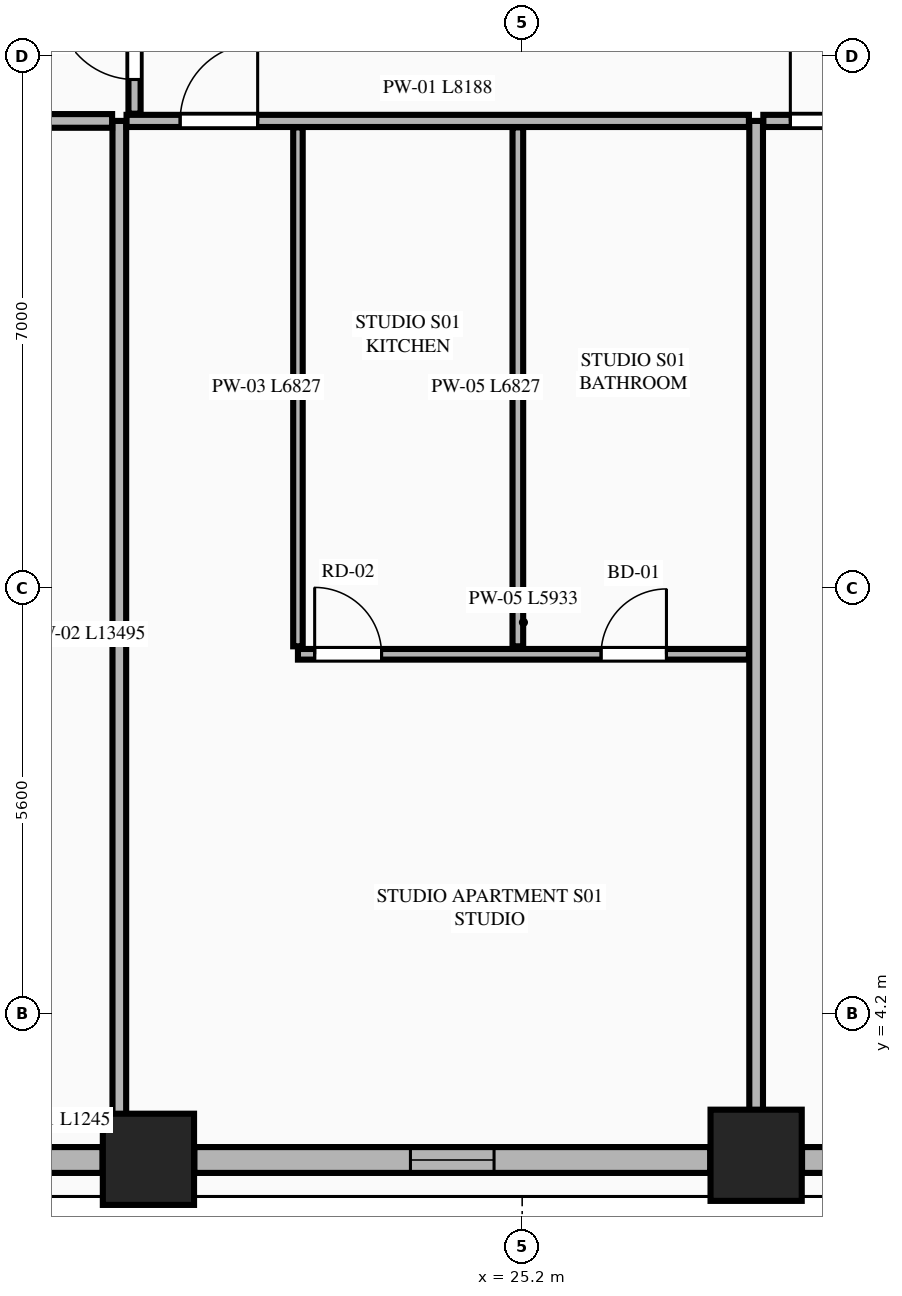
"""IFC4 building model, lengths in metres.
Left out: names, types, materials, properties, quantities, classifications, styles, units other than length and angle.
Written with IfcOpenShell. Run it as: python <this file> out.ifc"""

import sys

from ifc_helpers import new_model, si_unit, direction, frame, frame_2d, origin, origin_2d, place, context, subcontext, project, spatial, rectangle, extrude, element, fill, save


model = new_model("IFC4")
c1 = context("Model", 3, precision=1e-05, world=origin(), true_north=direction((0.0, 1.0)))
c2 = subcontext(c1, "Body", "Model", "MODEL_VIEW")
j1 = project(units=[si_unit("LENGTHUNIT", "METRE"), si_unit("PLANEANGLEUNIT", "RADIAN")], contexts=[c1])
p1 = place(None, origin())
s1 = spatial("IfcSite", under=j1, at=p1, CompositionType="ELEMENT")
p2 = place(p1, origin())
s2 = spatial("IfcBuilding", under=s1, at=p2, CompositionType="ELEMENT")
p3 = place(p2, frame((0.0, 0.0, 35.55)))
s3 = spatial("IfcBuildingStorey", under=s2, at=p3, CompositionType="ELEMENT", Elevation=35.55)
for number, where, z_axis, x_axis in (
    (1, (20.283, 2.289, 0.0), (0.0, 0.0, 1.0), (1.0, 0.0, 0.0)),
    (2, (28.278, 2.342, 0.0), (0.0, 0.0, 1.0), (1.0, 0.0, 0.0)),
):
    element("IfcColumn", number, at=place(p3, frame(where, z_axis=z_axis, x_axis=x_axis)), inside=s3, PredefinedType="COLUMN", context=c2, shape_type="SweptSolid", body=[
        extrude(rectangle(XDim=1.2, YDim=1.2, at=origin_2d()), origin(), (0.0, 0.0, 1.0), 3.55),
    ])
p4 = place(p3, frame((18.434, 2.28, 0.0), z_axis=(0.0, 0.0, 1.0), x_axis=(1.0, 0.0, 0.0)))
e3 = element("IfcWall", 3, at=p4, inside=s3, PredefinedType="STANDARD", context=c2, shape_type="SweptSolid", body=[
    extrude(rectangle(XDim=1.245, YDim=0.34, at=frame_2d((0.623, 0.0))), origin(), (0.0, 0.0, 1.0), 3.33),
])
p5 = place(p3, frame((20.887, 2.28, 0.0), z_axis=(0.0, 0.0, 1.0), x_axis=(1.0, 0.0, 0.0)))
e4 = element("IfcWall", 4, at=p5, inside=s3, PredefinedType="STANDARD", context=c2, shape_type="SweptSolid", body=[
    extrude(rectangle(XDim=6.787, YDim=0.34, at=frame_2d((3.394, 0.0))), origin(), (0.0, 0.0, 1.0), 2.787),
])
p6 = place(p5, frame((2.843, 0.0, 0.75)))
e5 = element("IfcOpeningElement", 5, at=p6, cuts=e4, PredefinedType="OPENING", context=c2, shape_type="SweptSolid", body=[
    extrude(rectangle(XDim=1.1, YDim=1.887, at=frame_2d((0.55, 0.943))), frame((0.0, 0.18, 0.0), z_axis=(0.0, -1.0, 0.0), x_axis=(1.0, 0.0, 0.0)), (0.0, 0.0, 1.0), 0.36),
])
p7 = place(p3, frame((28.882, 2.28, 0.0), z_axis=(0.0, 0.0, 1.0), x_axis=(1.0, 0.0, 0.0)))
e6 = element("IfcWall", 6, at=p7, inside=s3, PredefinedType="STANDARD", context=c2, shape_type="SweptSolid", body=[
    extrude(rectangle(XDim=7.036, YDim=0.34, at=frame_2d((3.518, 0.0))), origin(), (0.0, 0.0, 1.0), 2.787),
])
p8 = place(p7, frame((2.968, 0.0, 0.75)))
e7 = element("IfcOpeningElement", 7, at=p8, cuts=e6, PredefinedType="OPENING", context=c2, shape_type="SweptSolid", body=[
    extrude(rectangle(XDim=1.1, YDim=1.887, at=frame_2d((0.55, 0.943))), frame((0.0, 0.18, 0.0), z_axis=(0.0, -1.0, 0.0), x_axis=(1.0, 0.0, 0.0)), (0.0, 0.0, 1.0), 0.36),
])
p9 = place(p3, frame((19.9, 2.455, 0.0), z_axis=(0.0, 0.0, 1.0), x_axis=(0.0, 1.0, 0.0)))
e8 = element("IfcWall", 8, at=p9, inside=s3, PredefinedType="PARTITIONING", context=c2, shape_type="SweptSolid", body=[
    extrude(rectangle(XDim=13.495, YDim=0.18, at=frame_2d((6.748, 0.0))), origin(), (0.0, 0.0, 1.0), 3.33),
])
p10 = place(p3, frame((28.278, 2.455, 0.0), z_axis=(0.0, 0.0, 1.0), x_axis=(0.0, 1.0, 0.0)))
e9 = element("IfcWall", 9, at=p10, inside=s3, PredefinedType="PARTITIONING", context=c2, shape_type="SweptSolid", body=[
    extrude(rectangle(XDim=13.495, YDim=0.18, at=frame_2d((6.748, 0.0))), origin(), (0.0, 0.0, 1.0), 2.7),
])
p11 = place(p3, frame((19.995, 15.95, 0.0), z_axis=(0.0, 0.0, 1.0), x_axis=(1.0, 0.0, 0.0)))
e10 = element("IfcWall", 10, at=p11, inside=s3, PredefinedType="PARTITIONING", context=c2, shape_type="SweptSolid", body=[
    extrude(rectangle(XDim=8.188, YDim=0.16, at=frame_2d((4.094, 0.0))), origin(), (0.0, 0.0, 1.0), 3.33),
])
p12 = place(p11, frame((0.705, 0.0, 0.0)))
e11 = element("IfcOpeningElement", 11, at=p12, cuts=e10, PredefinedType="OPENING", context=c2, shape_type="SweptSolid", body=[
    extrude(rectangle(XDim=1.02, YDim=2.25, at=frame_2d((0.51, 1.125))), frame((0.0, 0.09, 0.0), z_axis=(0.0, -1.0, 0.0), x_axis=(1.0, 0.0, 0.0)), (0.0, 0.0, 1.0), 0.18),
])
p13 = place(p3, frame((22.25, 9.038, 0.0), z_axis=(0.0, 0.0, 1.0), x_axis=(0.0, 1.0, 0.0)))
e12 = element("IfcWall", 12, at=p13, inside=s3, PredefinedType="PARTITIONING", context=c2, shape_type="SweptSolid", body=[
    extrude(rectangle(XDim=6.827, YDim=0.125, at=frame_2d((3.414, 0.0))), origin(), (0.0, 0.0, 1.0), 2.7),
])
p14 = place(p3, frame((22.25, 8.933, 0.0), z_axis=(0.0, 0.0, 1.0), x_axis=(1.0, 0.0, 0.0)))
e13 = element("IfcWall", 13, at=p14, inside=s3, PredefinedType="PLUMBINGWALL", context=c2, shape_type="SweptSolid", body=[
    extrude(rectangle(XDim=5.933, YDim=0.14, at=frame_2d((2.967, 0.0))), origin(), (0.0, 0.0, 1.0), 3.33),
])
p15 = place(p14, frame((3.988, 0.0, 0.0)))
e14 = element("IfcOpeningElement", 14, at=p15, cuts=e13, PredefinedType="OPENING", context=c2, shape_type="SweptSolid", body=[
    extrude(rectangle(XDim=0.86, YDim=2.1, at=frame_2d((0.43, 1.05))), frame((0.0, 0.08, 0.0), z_axis=(0.0, -1.0, 0.0), x_axis=(1.0, 0.0, 0.0)), (0.0, 0.0, 1.0), 0.16),
])
p16 = place(p14, frame((0.22, 0.0, 0.0)))
e15 = element("IfcOpeningElement", 15, at=p16, cuts=e13, PredefinedType="OPENING", context=c2, shape_type="SweptSolid", body=[
    extrude(rectangle(XDim=0.88, YDim=2.15, at=frame_2d((0.44, 1.075))), frame((0.0, 0.08, 0.0), z_axis=(0.0, -1.0, 0.0), x_axis=(1.0, 0.0, 0.0)), (0.0, 0.0, 1.0), 0.16),
])
p17 = place(p3, frame((25.143, 9.038, 0.0), z_axis=(0.0, 0.0, 1.0), x_axis=(0.0, 1.0, 0.0)))
e16 = element("IfcWall", 16, at=p17, inside=s3, PredefinedType="PLUMBINGWALL", context=c2, shape_type="SweptSolid", body=[
    extrude(rectangle(XDim=6.827, YDim=0.14, at=frame_2d((3.414, 0.0))), origin(), (0.0, 0.0, 1.0), 3.33),
])
p18 = place(p3, frame((28.373, 15.95, 0.0), z_axis=(0.0, 0.0, 1.0), x_axis=(1.0, 0.0, 0.0)))
e17 = element("IfcWall", 17, at=p18, inside=s3, PredefinedType="PARTITIONING", context=c2, shape_type="SweptSolid", body=[
    extrude(rectangle(XDim=16.432, YDim=0.16, at=frame_2d((8.216, 0.0))), origin(), (0.0, 0.0, 1.0), 3.33),
])
p19 = place(p18, frame((0.355, 0.0, 0.0)))
e18 = element("IfcOpeningElement", 18, at=p19, cuts=e17, PredefinedType="OPENING", context=c2, shape_type="SweptSolid", body=[
    extrude(rectangle(XDim=1.35, YDim=2.35, at=frame_2d((0.675, 1.175))), frame((0.0, 0.09, 0.0), z_axis=(0.0, -1.0, 0.0), x_axis=(1.0, 0.0, 0.0)), (0.0, 0.0, 1.0), 0.18),
])
p20 = place(p3, frame((10.564, 15.95, 0.0), z_axis=(0.0, 0.0, 1.0), x_axis=(1.0, 0.0, 0.0)))
e19 = element("IfcWall", 19, at=p20, inside=s3, PredefinedType="PARTITIONING", context=c2, shape_type="SweptSolid", body=[
    extrude(rectangle(XDim=9.241, YDim=0.18, at=frame_2d((4.621, 0.0))), origin(), (0.0, 0.0, 1.0), 3.33),
])
p21 = place(p3, frame((20.1, 16.045, 0.0), z_axis=(0.0, 0.0, 1.0), x_axis=(0.0, 1.0, 0.0)))
e20 = element("IfcWall", 20, at=p21, inside=s3, PredefinedType="PARTITIONING", context=c2, shape_type="SweptSolid", body=[
    extrude(rectangle(XDim=9.76, YDim=0.16, at=frame_2d((4.88, 0.0))), origin(), (0.0, 0.0, 1.0), 2.7),
])
p22 = place(p21, frame((0.45, 0.0, 0.0)))
e21 = element("IfcOpeningElement", 21, at=p22, cuts=e20, PredefinedType="OPENING", context=c2, shape_type="SweptSolid", body=[
    extrude(rectangle(XDim=1.02, YDim=2.25, at=frame_2d((0.51, 1.125))), frame((0.0, 0.09, 0.0), z_axis=(0.0, -1.0, 0.0), x_axis=(1.0, 0.0, 0.0)), (0.0, 0.0, 1.0), 0.18),
])
p23 = place(p6, origin())
e22 = element("IfcWindow", 22, at=p23, inside=s3, PartitioningType="SINGLE_PANEL", PredefinedType="WINDOW", context=c2, shape_type="SweptSolid", body=[
    extrude(rectangle(XDim=1.1, YDim=1.887, at=frame_2d((0.55, 0.943))), frame((0.0, 0.03, 0.0), z_axis=(0.0, -1.0, 0.0), x_axis=(1.0, 0.0, 0.0)), (0.0, 0.0, 1.0), 0.06),
])
fill(e5, e22)
p24 = place(p15, origin())
e23 = element("IfcDoor", 23, at=p24, inside=s3, OperationType="SINGLE_SWING_RIGHT", PredefinedType="DOOR", context=c2, shape_type="SweptSolid", body=[
    extrude(rectangle(XDim=0.86, YDim=2.1, at=frame_2d((0.43, 1.05))), frame((0.0, 0.025, 0.0), z_axis=(0.0, -1.0, 0.0), x_axis=(1.0, 0.0, 0.0)), (0.0, 0.0, 1.0), 0.05),
])
fill(e14, e23)
p25 = place(p12, origin())
e24 = element("IfcDoor", 24, at=p25, inside=s3, OperationType="SINGLE_SWING_RIGHT", PredefinedType="DOOR", context=c2, shape_type="SweptSolid", body=[
    extrude(rectangle(XDim=1.02, YDim=2.25, at=frame_2d((0.51, 1.125))), frame((0.0, 0.025, 0.0), z_axis=(0.0, -1.0, 0.0), x_axis=(1.0, 0.0, 0.0)), (0.0, 0.0, 1.0), 0.05),
])
fill(e11, e24)
p26 = place(p16, origin())
e25 = element("IfcDoor", 25, at=p26, inside=s3, OperationType="SINGLE_SWING_LEFT", PredefinedType="DOOR", context=c2, shape_type="SweptSolid", body=[
    extrude(rectangle(XDim=0.88, YDim=2.15, at=frame_2d((0.44, 1.075))), frame((0.0, 0.025, 0.0), z_axis=(0.0, -1.0, 0.0), x_axis=(1.0, 0.0, 0.0)), (0.0, 0.0, 1.0), 0.05),
])
fill(e15, e25)
p27 = place(p19, origin())
e26 = element("IfcDoor", 26, at=p27, inside=s3, OperationType="SINGLE_SWING_LEFT", PredefinedType="DOOR", context=c2, shape_type="SweptSolid", body=[
    extrude(rectangle(XDim=1.35, YDim=2.35, at=frame_2d((0.675, 1.175))), frame((0.0, 0.025, 0.0), z_axis=(0.0, -1.0, 0.0), x_axis=(1.0, 0.0, 0.0)), (0.0, 0.0, 1.0), 0.05),
])
fill(e18, e26)
p28 = place(p22, origin())
e27 = element("IfcDoor", 27, at=p28, inside=s3, OperationType="SINGLE_SWING_RIGHT", PredefinedType="DOOR", context=c2, shape_type="SweptSolid", body=[
    extrude(rectangle(XDim=1.02, YDim=2.25, at=frame_2d((0.51, 1.125))), frame((0.0, 0.025, 0.0), z_axis=(0.0, -1.0, 0.0), x_axis=(1.0, 0.0, 0.0)), (0.0, 0.0, 1.0), 0.05),
])
fill(e21, e27)
save(model, sys.argv[1])
